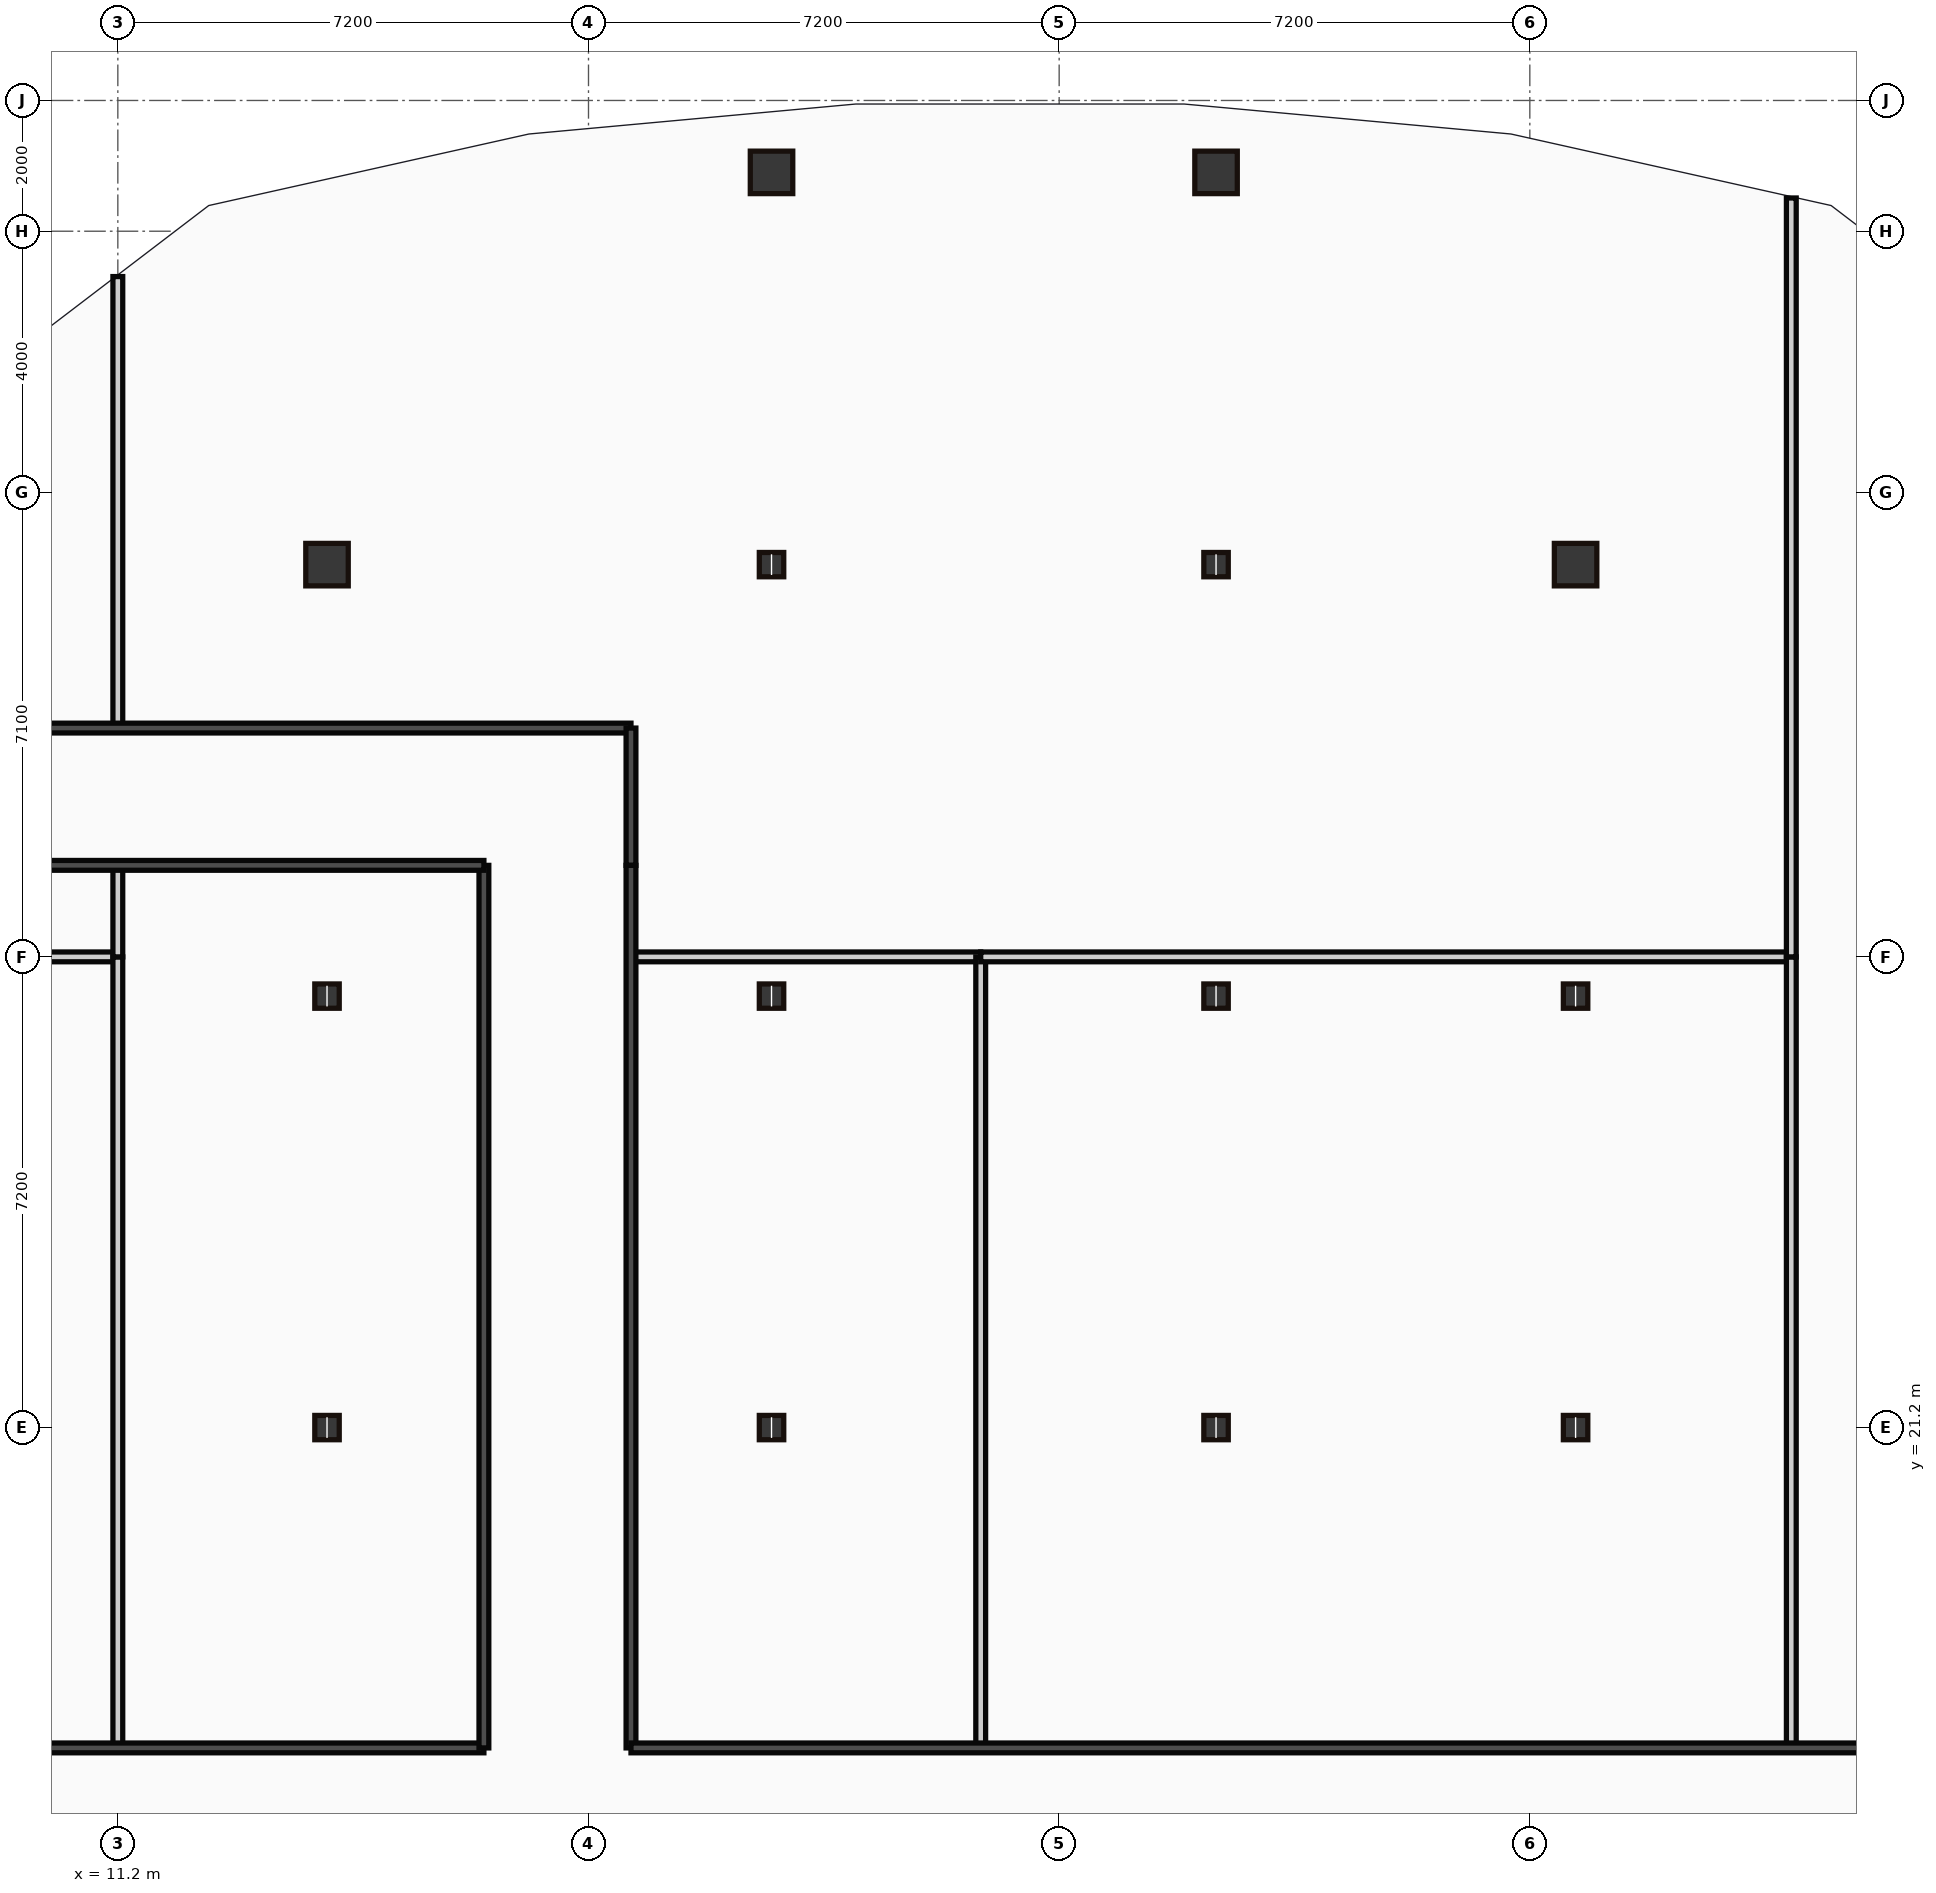
"""IFC4 building model, lengths in metres.
Left out: names, types, materials, properties, quantities, classifications, styles, units other than length and angle.
Written with IfcOpenShell. Run it as: python <this file> out.ifc"""

import sys

from ifc_helpers import new_model, si_unit, direction, frame, frame_2d, origin, origin_2d, place, context, subcontext, project, spatial, rectangle, hollow_rectangle, i_section, extrude, source, transform, mapped, element, fill, save


model = new_model("IFC4")
c1 = context("Model", 3, precision=1e-05, world=origin(), true_north=direction((0.0, 1.0)))
c2 = subcontext(c1, "Body", "Model", "MODEL_VIEW")
j1 = project(units=[si_unit("LENGTHUNIT", "METRE"), si_unit("PLANEANGLEUNIT", "RADIAN")], contexts=[c1])
p1 = place(None, origin())
s1 = spatial("IfcSite", under=j1, at=p1, CompositionType="ELEMENT")
p2 = place(p1, origin())
s2 = spatial("IfcBuilding", under=s1, at=p2, CompositionType="ELEMENT")
p3 = place(p2, frame((0.0, 0.0, 184.4)))
s3 = spatial("IfcBuildingStorey", under=s2, at=p3, CompositionType="ELEMENT", Elevation=184.4)
m1 = source(origin(), c2, "Body", "SweptSolid", [
    extrude(i_section(OverallWidth=0.374, OverallDepth=0.372, WebThickness=0.016, FlangeThickness=0.026, at=origin_2d()), origin(), (0.0, 0.0, 1.0), 4.2),
])
for number, where, z_axis, x_axis in (
    (1, (14.4, 21.2, 0.0), (0.0, 0.0, 1.0), (1.0, 0.0, 0.0)),
    (2, (14.4, 27.8, 0.0), (0.0, 0.0, 1.0), (1.0, 0.0, 0.0)),
):
    element("IfcColumn", number, at=place(p3, frame(where, z_axis=z_axis, x_axis=x_axis)), inside=s3, PredefinedType="COLUMN", context=c2, shape_type="MappedRepresentation", body=[
        mapped(m1, transform((0.0, 0.0, 0.0))),
    ])
m2 = source(origin(), c2, "Body", "SweptSolid", [
    extrude(hollow_rectangle(XDim=0.65, YDim=0.65, WallThickness=0.032, at=origin_2d()), origin(), (0.0, 0.0, 1.0), 4.2),
])
p4 = place(p3, frame((14.4, 34.4, 0.0), z_axis=(0.0, 0.0, 1.0), x_axis=(1.0, 0.0, 0.0)))
e3 = element("IfcColumn", 3, at=p4, inside=s3, PredefinedType="COLUMN", context=c2, shape_type="MappedRepresentation", body=[
    mapped(m2, transform((0.0, 0.0, 0.0))),
])
for number, where, z_axis, x_axis in (
    (4, (21.2, 21.2, 0.0), (0.0, 0.0, 1.0), (1.0, 0.0, 0.0)),
    (5, (21.2, 27.8, 0.0), (0.0, 0.0, 1.0), (1.0, 0.0, 0.0)),
    (6, (21.2, 34.4, 0.0), (0.0, 0.0, 1.0), (1.0, 0.0, 0.0)),
):
    element("IfcColumn", number, at=place(p3, frame(where, z_axis=z_axis, x_axis=x_axis)), inside=s3, PredefinedType="COLUMN", context=c2, shape_type="MappedRepresentation", body=[
        mapped(m1, transform((0.0, 0.0, 0.0))),
    ])
p5 = place(p3, frame((21.2, 40.4, 0.0), z_axis=(0.0, 0.0, 1.0), x_axis=(1.0, 0.0, 0.0)))
e7 = element("IfcColumn", 7, at=p5, inside=s3, PredefinedType="COLUMN", context=c2, shape_type="MappedRepresentation", body=[
    mapped(m2, transform((0.0, 0.0, 0.0))),
])
for number, where, z_axis, x_axis in (
    (8, (28.0, 21.2, 0.0), (0.0, 0.0, 1.0), (1.0, 0.0, 0.0)),
    (9, (28.0, 27.8, 0.0), (0.0, 0.0, 1.0), (1.0, 0.0, 0.0)),
    (10, (28.0, 34.4, 0.0), (0.0, 0.0, 1.0), (1.0, 0.0, 0.0)),
):
    element("IfcColumn", number, at=place(p3, frame(where, z_axis=z_axis, x_axis=x_axis)), inside=s3, PredefinedType="COLUMN", context=c2, shape_type="MappedRepresentation", body=[
        mapped(m1, transform((0.0, 0.0, 0.0))),
    ])
p6 = place(p3, frame((28.0, 40.4, 0.0), z_axis=(0.0, 0.0, 1.0), x_axis=(1.0, 0.0, 0.0)))
e11 = element("IfcColumn", 11, at=p6, inside=s3, PredefinedType="COLUMN", context=c2, shape_type="MappedRepresentation", body=[
    mapped(m2, transform((0.0, 0.0, 0.0))),
])
for number, where, z_axis, x_axis in (
    (12, (33.5, 21.2, 0.0), (0.0, 0.0, 1.0), (1.0, 0.0, 0.0)),
    (13, (33.5, 27.8, 0.0), (0.0, 0.0, 1.0), (1.0, 0.0, 0.0)),
):
    element("IfcColumn", number, at=place(p3, frame(where, z_axis=z_axis, x_axis=x_axis)), inside=s3, PredefinedType="COLUMN", context=c2, shape_type="MappedRepresentation", body=[
        mapped(m1, transform((0.0, 0.0, 0.0))),
    ])
p7 = place(p3, frame((33.5, 34.4, 0.0), z_axis=(0.0, 0.0, 1.0), x_axis=(1.0, 0.0, 0.0)))
e14 = element("IfcColumn", 14, at=p7, inside=s3, PredefinedType="COLUMN", context=c2, shape_type="MappedRepresentation", body=[
    mapped(m2, transform((0.0, 0.0, 0.0))),
])
m3 = source(origin(), c2, "Body", "SweptSolid", [
    extrude(rectangle(XDim=12.2, YDim=0.15, at=frame_2d((6.1, 0.0))), origin(), (0.0, 0.0, 1.0), 3.95),
])
p8 = place(p3, frame((4.6, 16.3, 0.0), z_axis=(0.0, 0.0, 1.0), x_axis=(1.0, 0.0, 0.0)))
e15 = element("IfcWall", 15, at=p8, inside=s3, PredefinedType="PARTITIONING", context=c2, shape_type="MappedRepresentation", body=[
    mapped(m3, transform((0.0, 0.0, 0.0))),
])
p9 = place(p8, frame((2.955, 0.0, 0.0)))
e16 = element("IfcOpeningElement", 16, at=p9, cuts=e15, PredefinedType="OPENING", context=c2, shape_type="SweptSolid", body=[
    extrude(rectangle(XDim=0.95, YDim=2.15, at=frame_2d((0.475, 1.075))), frame((0.0, 0.085, 0.0), z_axis=(0.0, -1.0, 0.0), x_axis=(1.0, 0.0, 0.0)), (0.0, 0.0, 1.0), 0.17),
])
m4 = source(origin(), c2, "Body", "SweptSolid", [
    extrude(rectangle(XDim=13.5, YDim=0.15, at=frame_2d((6.75, 0.0))), origin(), (0.0, 0.0, 1.0), 3.95),
])
p10 = place(p3, frame((16.8, 16.3, 0.0), z_axis=(0.0, 0.0, 1.0), x_axis=(0.0, 1.0, 0.0)))
e17 = element("IfcWall", 17, at=p10, inside=s3, PredefinedType="PARTITIONING", context=c2, shape_type="MappedRepresentation", body=[
    mapped(m4, transform((0.0, 0.0, 0.0))),
])
p11 = place(p10, frame((6.275, 0.0, 0.0)))
e18 = element("IfcOpeningElement", 18, at=p11, cuts=e17, PredefinedType="OPENING", context=c2, shape_type="SweptSolid", body=[
    extrude(rectangle(XDim=0.95, YDim=2.15, at=frame_2d((0.475, 1.075))), frame((0.0, 0.085, 0.0), z_axis=(0.0, -1.0, 0.0), x_axis=(1.0, 0.0, 0.0)), (0.0, 0.0, 1.0), 0.17),
])
p12 = place(p3, frame((16.8, 29.8, 0.0), z_axis=(0.0, 0.0, 1.0), x_axis=(-1.0, 0.0, 0.0)))
e19 = element("IfcWall", 19, at=p12, inside=s3, PredefinedType="PARTITIONING", context=c2, shape_type="MappedRepresentation", body=[
    mapped(m3, transform((0.0, 0.0, 0.0))),
])
m5 = source(origin(), c2, "Body", "SweptSolid", [
    extrude(rectangle(XDim=14.45, YDim=0.15, at=frame_2d((7.225, 0.0))), origin(), (0.0, 0.0, 1.0), 3.95),
])
p13 = place(p3, frame((4.6, 31.9, 0.0), z_axis=(0.0, 0.0, 1.0), x_axis=(1.0, 0.0, 0.0)))
e20 = element("IfcWall", 20, at=p13, inside=s3, PredefinedType="PARTITIONING", context=c2, shape_type="MappedRepresentation", body=[
    mapped(m5, transform((0.0, 0.0, 0.0))),
])
p14 = place(p13, frame((2.955, 0.0, 0.0)))
e21 = element("IfcOpeningElement", 21, at=p14, cuts=e20, PredefinedType="OPENING", context=c2, shape_type="SweptSolid", body=[
    extrude(rectangle(XDim=0.95, YDim=2.15, at=frame_2d((0.475, 1.075))), frame((0.0, 0.085, 0.0), z_axis=(0.0, -1.0, 0.0), x_axis=(1.0, 0.0, 0.0)), (0.0, 0.0, 1.0), 0.17),
])
p15 = place(p13, frame((9.92, 0.0, 0.0)))
e22 = element("IfcOpeningElement", 22, at=p15, cuts=e20, PredefinedType="OPENING", context=c2, shape_type="SweptSolid", body=[
    extrude(rectangle(XDim=0.95, YDim=2.15, at=frame_2d((0.475, 1.075))), frame((0.0, 0.085, 0.0), z_axis=(0.0, -1.0, 0.0), x_axis=(1.0, 0.0, 0.0)), (0.0, 0.0, 1.0), 0.17),
])
m6 = source(origin(), c2, "Body", "SweptSolid", [
    extrude(rectangle(XDim=2.1, YDim=0.15, at=frame_2d((1.05, 0.0))), origin(), (0.0, 0.0, 1.0), 3.95),
])
p16 = place(p3, frame((19.05, 31.9, 0.0), z_axis=(0.0, 0.0, 1.0), x_axis=(0.0, -1.0, 0.0)))
e23 = element("IfcWall", 23, at=p16, inside=s3, PredefinedType="PARTITIONING", context=c2, shape_type="MappedRepresentation", body=[
    mapped(m6, transform((0.0, 0.0, 0.0))),
])
p17 = place(p3, frame((19.05, 29.8, 0.0), z_axis=(0.0, 0.0, 1.0), x_axis=(0.0, -1.0, 0.0)))
e24 = element("IfcWall", 24, at=p17, inside=s3, PredefinedType="PARTITIONING", context=c2, shape_type="MappedRepresentation", body=[
    mapped(m4, transform((0.0, 0.0, 0.0))),
])
p18 = place(p17, frame((6.845, 0.0, 0.0)))
e25 = element("IfcOpeningElement", 25, at=p18, cuts=e24, PredefinedType="OPENING", context=c2, shape_type="SweptSolid", body=[
    extrude(rectangle(XDim=0.95, YDim=2.15, at=frame_2d((0.475, 1.075))), frame((0.0, 0.085, 0.0), z_axis=(0.0, -1.0, 0.0), x_axis=(1.0, 0.0, 0.0)), (0.0, 0.0, 1.0), 0.17),
])
m7 = source(origin(), c2, "Body", "SweptSolid", [
    extrude(rectangle(XDim=21.75, YDim=0.15, at=frame_2d((10.875, 0.0))), origin(), (0.0, 0.0, 1.0), 3.95),
])
p19 = place(p3, frame((19.05, 16.3, 0.0), z_axis=(0.0, 0.0, 1.0), x_axis=(1.0, 0.0, 0.0)))
e26 = element("IfcWall", 26, at=p19, inside=s3, PredefinedType="PARTITIONING", context=c2, shape_type="MappedRepresentation", body=[
    mapped(m7, transform((0.0, 0.0, 0.0))),
])
p20 = place(p19, frame((11.075, 0.0, 0.0)))
e27 = element("IfcOpeningElement", 27, at=p20, cuts=e26, PredefinedType="OPENING", context=c2, shape_type="SweptSolid", body=[
    extrude(rectangle(XDim=0.95, YDim=2.15, at=frame_2d((0.475, 1.075))), frame((0.0, 0.085, 0.0), z_axis=(0.0, -1.0, 0.0), x_axis=(1.0, 0.0, 0.0)), (0.0, 0.0, 1.0), 0.17),
])
p21 = place(p19, frame((19.145, 0.0, 0.0)))
e28 = element("IfcOpeningElement", 28, at=p21, cuts=e26, PredefinedType="OPENING", context=c2, shape_type="SweptSolid", body=[
    extrude(rectangle(XDim=0.95, YDim=2.15, at=frame_2d((0.475, 1.075))), frame((0.0, 0.085, 0.0), z_axis=(0.0, -1.0, 0.0), x_axis=(1.0, 0.0, 0.0)), (0.0, 0.0, 1.0), 0.17),
])
m8 = source(origin(), c2, "Body", "SweptSolid", [
    extrude(rectangle(XDim=11.18, YDim=0.15, at=frame_2d((5.59, 0.0))), origin(), (0.0, 0.0, 1.0), 3.95),
])
p22 = place(p3, frame((0.02, 28.4, 0.0), z_axis=(0.0, 0.0, 1.0), x_axis=(1.0, 0.0, 0.0)))
e29 = element("IfcWall", 29, at=p22, inside=s3, PredefinedType="PARTITIONING", context=c2, shape_type="MappedRepresentation", body=[
    mapped(m8, transform((0.0, 0.0, 0.0))),
])
m9 = source(origin(), c2, "Body", "SweptSolid", [
    extrude(rectangle(XDim=12.1, YDim=0.15, at=frame_2d((6.05, 0.0))), origin(), (0.0, 0.0, 1.0), 3.95),
])
p23 = place(p3, frame((11.2, 28.4, 0.0), z_axis=(0.0, 0.0, 1.0), x_axis=(0.0, -1.0, 0.0)))
e30 = element("IfcWall", 30, at=p23, inside=s3, PredefinedType="PARTITIONING", context=c2, shape_type="MappedRepresentation", body=[
    mapped(m9, transform((0.0, 0.0, 0.0))),
])
m10 = source(origin(), c2, "Body", "SweptSolid", [
    extrude(rectangle(XDim=1.4, YDim=0.15, at=frame_2d((0.7, 0.0))), origin(), (0.0, 0.0, 1.0), 3.95),
])
p24 = place(p3, frame((11.2, 29.8, 0.0), z_axis=(0.0, 0.0, 1.0), x_axis=(0.0, -1.0, 0.0)))
e31 = element("IfcWall", 31, at=p24, inside=s3, PredefinedType="PARTITIONING", context=c2, shape_type="MappedRepresentation", body=[
    mapped(m10, transform((0.0, 0.0, 0.0))),
])
m11 = source(origin(), c2, "Body", "SweptSolid", [
    extrude(rectangle(XDim=6.906, YDim=0.15, at=frame_2d((3.453, 0.0))), origin(), (0.0, 0.0, 1.0), 3.95),
])
p25 = place(p3, frame((11.2, 38.806, 0.0), z_axis=(0.0, 0.0, 1.0), x_axis=(0.0, -1.0, 0.0)))
e32 = element("IfcWall", 32, at=p25, inside=s3, PredefinedType="PARTITIONING", context=c2, shape_type="MappedRepresentation", body=[
    mapped(m11, transform((0.0, 0.0, 0.0))),
])
m12 = source(origin(), c2, "Body", "SweptSolid", [
    extrude(rectangle(XDim=5.35, YDim=0.15, at=frame_2d((2.675, 0.0))), origin(), (0.0, 0.0, 1.0), 3.95),
])
p26 = place(p3, frame((19.05, 28.4, 0.0), z_axis=(0.0, 0.0, 1.0), x_axis=(1.0, 0.0, 0.0)))
e33 = element("IfcWall", 33, at=p26, inside=s3, PredefinedType="PARTITIONING", context=c2, shape_type="MappedRepresentation", body=[
    mapped(m12, transform((0.0, 0.0, 0.0))),
])
p27 = place(p3, frame((24.4, 28.4, 0.0), z_axis=(0.0, 0.0, 1.0), x_axis=(0.0, -1.0, 0.0)))
e34 = element("IfcWall", 34, at=p27, inside=s3, PredefinedType="PARTITIONING", context=c2, shape_type="MappedRepresentation", body=[
    mapped(m9, transform((0.0, 0.0, 0.0))),
])
m13 = source(origin(), c2, "Body", "SweptSolid", [
    extrude(rectangle(XDim=12.4, YDim=0.15, at=frame_2d((6.2, 0.0))), origin(), (0.0, 0.0, 1.0), 3.95),
])
p28 = place(p3, frame((36.8, 28.4, 0.0), z_axis=(0.0, 0.0, 1.0), x_axis=(-1.0, 0.0, 0.0)))
e35 = element("IfcWall", 35, at=p28, inside=s3, PredefinedType="PARTITIONING", context=c2, shape_type="MappedRepresentation", body=[
    mapped(m13, transform((0.0, 0.0, 0.0))),
])
p29 = place(p3, frame((36.8, 28.4, 0.0), z_axis=(0.0, 0.0, 1.0), x_axis=(0.0, -1.0, 0.0)))
e36 = element("IfcWall", 36, at=p29, inside=s3, PredefinedType="PARTITIONING", context=c2, shape_type="MappedRepresentation", body=[
    mapped(m9, transform((0.0, 0.0, 0.0))),
])
m14 = source(origin(), c2, "Body", "SweptSolid", [
    extrude(rectangle(XDim=11.608, YDim=0.15, at=frame_2d((5.804, 0.0))), origin(), (0.0, 0.0, 1.0), 3.95),
])
p30 = place(p3, frame((36.8, 40.008, 0.0), z_axis=(0.0, 0.0, 1.0), x_axis=(0.0, -1.0, 0.0)))
e37 = element("IfcWall", 37, at=p30, inside=s3, PredefinedType="PARTITIONING", context=c2, shape_type="MappedRepresentation", body=[
    mapped(m14, transform((0.0, 0.0, 0.0))),
])
m15 = source(origin(), c2, "Body", "SweptSolid", [
    extrude(rectangle(XDim=0.95, YDim=2.15, at=frame_2d((0.475, 1.075))), frame((0.0, 0.025, 0.0), z_axis=(0.0, -1.0, 0.0), x_axis=(1.0, 0.0, 0.0)), (0.0, 0.0, 1.0), 0.05),
])
p31 = place(p11, origin())
e38 = element("IfcDoor", 38, at=p31, inside=s3, OperationType="SINGLE_SWING_LEFT", PredefinedType="DOOR", context=c2, shape_type="MappedRepresentation", body=[
    mapped(m15, transform((0.0, 0.0, 0.0))),
])
fill(e18, e38)
p32 = place(p18, origin())
e39 = element("IfcDoor", 39, at=p32, inside=s3, OperationType="SINGLE_SWING_RIGHT", PredefinedType="DOOR", context=c2, shape_type="MappedRepresentation", body=[
    mapped(m15, transform((0.0, 0.0, 0.0))),
])
fill(e25, e39)
p33 = place(p15, origin())
e40 = element("IfcDoor", 40, at=p33, inside=s3, OperationType="SINGLE_SWING_LEFT", PredefinedType="DOOR", context=c2, shape_type="MappedRepresentation", body=[
    mapped(m15, transform((0.0, 0.0, 0.0))),
])
fill(e22, e40)
p34 = place(p20, origin())
e41 = element("IfcDoor", 41, at=p34, inside=s3, OperationType="SINGLE_SWING_RIGHT", PredefinedType="DOOR", context=c2, shape_type="MappedRepresentation", body=[
    mapped(m15, transform((0.0, 0.0, 0.0))),
])
fill(e27, e41)
save(model, sys.argv[1])
